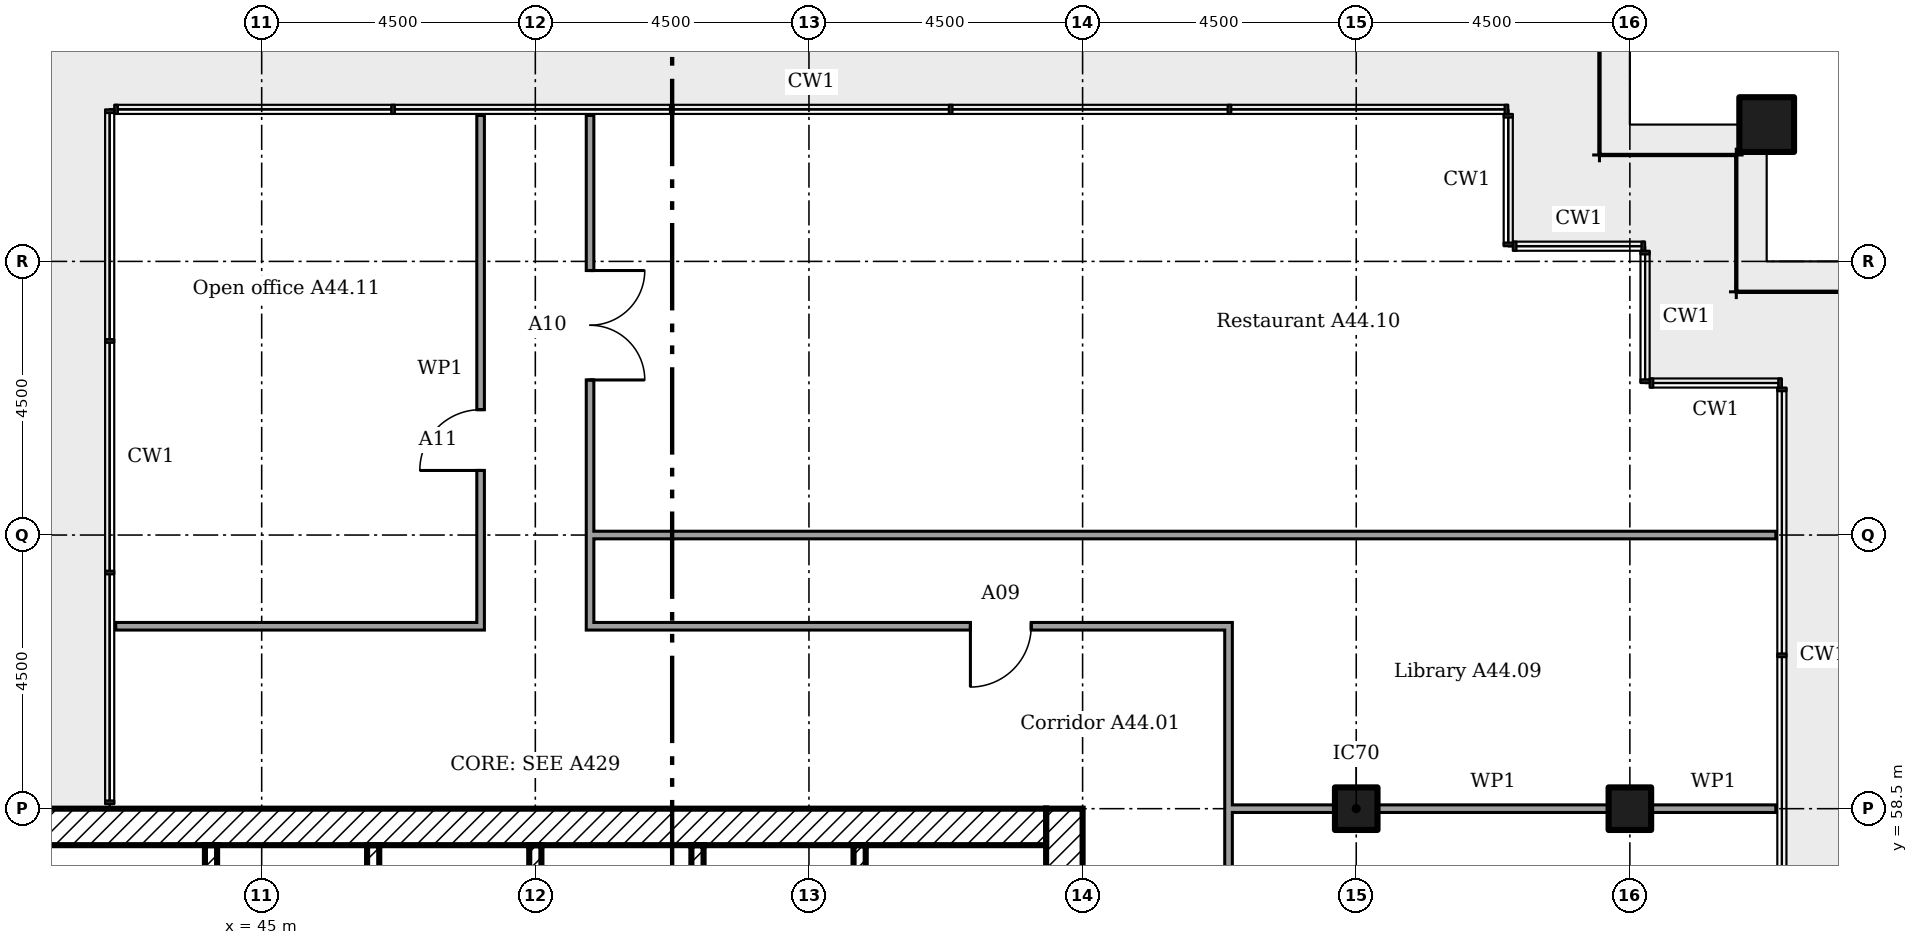
"""IFC4 building model, lengths in metres.
Left out: names, types, materials, properties, quantities, classifications, styles, units other than length and angle.
Written with IfcOpenShell. Run it as: python <this file> out.ifc"""

import sys

from ifc_helpers import new_model, si_unit, direction, frame, frame_2d, origin, origin_2d, place, context, subcontext, project, spatial, rectangle, extrude, element, fill, save


model = new_model("IFC4")
c1 = context("Model", 3, precision=1e-05, world=origin(), true_north=direction((0.0, 1.0)))
c2 = subcontext(c1, "Body", "Model", "MODEL_VIEW")
j1 = project(units=[si_unit("LENGTHUNIT", "METRE"), si_unit("PLANEANGLEUNIT", "RADIAN")], contexts=[c1])
p1 = place(None, origin())
s1 = spatial("IfcSite", under=j1, at=p1, CompositionType="ELEMENT")
p2 = place(p1, origin())
s2 = spatial("IfcBuilding", under=s1, at=p2, CompositionType="ELEMENT")
p3 = place(p2, frame((0.0, 0.0, 176.2)))
s3 = spatial("IfcBuildingStorey", under=s2, at=p3, CompositionType="ELEMENT", Elevation=176.2)
p4 = place(p3, frame((69.75, 69.75, 0.0)))
e1 = element("IfcColumn", 1, at=p4, inside=s3, PredefinedType="COLUMN", context=c2, shape_type="SweptSolid", body=[
    extrude(rectangle(XDim=0.9, YDim=0.9, at=origin_2d()), origin(), (0.0, 0.0, 1.0), 3.6),
])
for number, where in (
    (2, (63.0, 58.5, 0.0)),
    (3, (67.5, 58.5, 0.0)),
):
    element("IfcColumn", number, at=place(p3, frame(where)), inside=s3, PredefinedType="COLUMN", context=c2, shape_type="SweptSolid", body=[
        extrude(rectangle(XDim=0.7, YDim=0.7, at=origin_2d()), origin(), (0.0, 0.0, 1.0), 3.6),
    ])
p5 = place(p3, frame((58.2, 40.5, 0.0), z_axis=(0.0, 0.0, 1.0), x_axis=(0.0, 1.0, 0.0)))
e4 = element("IfcWall", 4, at=p5, inside=s3, PredefinedType="SHEAR", context=c2, shape_type="SweptSolid", body=[
    extrude(rectangle(XDim=18.0, YDim=0.6, at=frame_2d((9.0, 0.0))), origin(), (0.0, 0.0, 1.0), 3.35),
])
p6 = place(p5, frame((13.15, 0.0, 0.0)))
e5 = element("IfcOpeningElement", 5, at=p6, cuts=e4, PredefinedType="OPENING", context=c2, shape_type="SweptSolid", body=[
    extrude(rectangle(XDim=1.2, YDim=2.1, at=frame_2d((0.6, 1.05))), frame((0.0, 0.31, 0.0), z_axis=(0.0, -1.0, 0.0), x_axis=(1.0, 0.0, 0.0)), (0.0, 0.0, 1.0), 0.62),
])
p7 = place(p5, frame((3.9, 0.0, 0.0)))
e6 = element("IfcOpeningElement", 6, at=p7, cuts=e4, PredefinedType="OPENING", context=c2, shape_type="SweptSolid", body=[
    extrude(rectangle(XDim=1.8, YDim=2.1, at=frame_2d((0.9, 1.05))), frame((0.0, 0.31, 0.0), z_axis=(0.0, -1.0, 0.0), x_axis=(1.0, 0.0, 0.0)), (0.0, 0.0, 1.0), 0.62),
])
p8 = place(p5, frame((11.525, 0.0, 0.0)))
e7 = element("IfcOpeningElement", 7, at=p8, cuts=e4, PredefinedType="OPENING", context=c2, shape_type="SweptSolid", body=[
    extrude(rectangle(XDim=1.0, YDim=2.1, at=frame_2d((0.5, 1.05))), frame((0.0, 0.31, 0.0), z_axis=(0.0, -1.0, 0.0), x_axis=(1.0, 0.0, 0.0)), (0.0, 0.0, 1.0), 0.62),
])
p9 = place(p3, frame((40.5, 58.2, 0.0)))
e8 = element("IfcWall", 8, at=p9, inside=s3, PredefinedType="SHEAR", context=c2, shape_type="SweptSolid", body=[
    extrude(rectangle(XDim=17.4, YDim=0.6, at=frame_2d((8.7, 0.0))), origin(), (0.0, 0.0, 1.0), 3.35),
])
p10 = place(p3, frame((44.167, 57.9, 0.0), z_axis=(0.0, 0.0, 1.0), x_axis=(0.0, -1.0, 0.0)))
e9 = element("IfcWall", 9, at=p10, inside=s3, PredefinedType="SHEAR", context=c2, shape_type="SweptSolid", body=[
    extrude(rectangle(XDim=3.5, YDim=0.2, at=frame_2d((1.75, 0.0))), origin(), (0.0, 0.0, 1.0), 3.35),
])
p11 = place(p3, frame((46.833, 57.9, 0.0), z_axis=(0.0, 0.0, 1.0), x_axis=(0.0, -1.0, 0.0)))
e10 = element("IfcWall", 10, at=p11, inside=s3, PredefinedType="SHEAR", context=c2, shape_type="SweptSolid", body=[
    extrude(rectangle(XDim=4.6, YDim=0.2, at=frame_2d((2.3, 0.0))), origin(), (0.0, 0.0, 1.0), 3.35),
])
for number, where, z_axis, x_axis in (
    (11, (49.5, 57.9, 0.0), (0.0, 0.0, 1.0), (0.0, -1.0, 0.0)),
    (12, (52.167, 57.9, 0.0), (0.0, 0.0, 1.0), (0.0, -1.0, 0.0)),
    (13, (54.833, 57.9, 0.0), (0.0, 0.0, 1.0), (0.0, -1.0, 0.0)),
):
    element("IfcWall", number, at=place(p3, frame(where, z_axis=z_axis, x_axis=x_axis)), inside=s3, PredefinedType="SHEAR", context=c2, shape_type="SweptSolid", body=[
        extrude(rectangle(XDim=2.7, YDim=0.2, at=frame_2d((1.35, 0.0))), origin(), (0.0, 0.0, 1.0), 3.35),
    ])
p12 = place(p3, frame((60.9, 58.5, 0.0)))
e14 = element("IfcWall", 14, at=p12, inside=s3, PredefinedType="PARTITIONING", context=c2, shape_type="SweptSolid", body=[
    extrude(rectangle(XDim=1.75, YDim=0.125, at=frame_2d((0.875, 0.0))), origin(), (0.0, 0.0, 1.0), 2.676),
])
p13 = place(p3, frame((63.35, 58.5, 0.0)))
e15 = element("IfcWall", 15, at=p13, inside=s3, PredefinedType="PARTITIONING", context=c2, shape_type="SweptSolid", body=[
    extrude(rectangle(XDim=3.8, YDim=0.125, at=frame_2d((1.9, 0.0))), origin(), (0.0, 0.0, 1.0), 2.676),
])
p14 = place(p3, frame((67.85, 58.5, 0.0)))
e16 = element("IfcWall", 16, at=p14, inside=s3, PredefinedType="PARTITIONING", context=c2, shape_type="SweptSolid", body=[
    extrude(rectangle(XDim=2.05, YDim=0.125, at=frame_2d((1.025, 0.0))), origin(), (0.0, 0.0, 1.0), 2.676),
])
p15 = place(p3, frame((42.6, 61.5, 0.0)))
e17 = element("IfcWall", 17, at=p15, inside=s3, PredefinedType="PARTITIONING", context=c2, shape_type="SweptSolid", body=[
    extrude(rectangle(XDim=6.062, YDim=0.125, at=frame_2d((3.031, 0.0))), origin(), (0.0, 0.0, 1.0), 3.45),
])
p16 = place(p3, frame((50.337, 61.5, 0.0)))
e18 = element("IfcWall", 18, at=p16, inside=s3, PredefinedType="PARTITIONING", context=c2, shape_type="SweptSolid", body=[
    extrude(rectangle(XDim=10.625, YDim=0.125, at=frame_2d((5.312, 0.0))), origin(), (0.0, 0.0, 1.0), 3.45),
])
p17 = place(p16, frame((6.317, 0.0, 0.0)))
e19 = element("IfcOpeningElement", 19, at=p17, cuts=e18, PredefinedType="OPENING", context=c2, shape_type="SweptSolid", body=[
    extrude(rectangle(XDim=1.0, YDim=2.1, at=frame_2d((0.5, 1.05))), frame((0.0, 0.073, 0.0), z_axis=(0.0, -1.0, 0.0), x_axis=(1.0, 0.0, 0.0)), (0.0, 0.0, 1.0), 0.145),
])
p18 = place(p3, frame((50.4, 63.0, 0.0)))
e20 = element("IfcWall", 20, at=p18, inside=s3, PredefinedType="PARTITIONING", context=c2, shape_type="SweptSolid", body=[
    extrude(rectangle(XDim=19.5, YDim=0.125, at=frame_2d((9.75, 0.0))), origin(), (0.0, 0.0, 1.0), 3.45),
])
p19 = place(p3, frame((48.6, 61.562, 0.0), z_axis=(0.0, 0.0, 1.0), x_axis=(0.0, 1.0, 0.0)))
e21 = element("IfcWall", 21, at=p19, inside=s3, PredefinedType="PARTITIONING", context=c2, shape_type="SweptSolid", body=[
    extrude(rectangle(XDim=8.337, YDim=0.125, at=frame_2d((4.169, 0.0))), origin(), (0.0, 0.0, 1.0), 3.45),
])
p20 = place(p19, frame((2.5, 0.0, 0.0)))
e22 = element("IfcOpeningElement", 22, at=p20, cuts=e21, PredefinedType="OPENING", context=c2, shape_type="SweptSolid", body=[
    extrude(rectangle(XDim=1.0, YDim=2.1, at=frame_2d((0.5, 1.05))), frame((0.0, 0.073, 0.0), z_axis=(0.0, -1.0, 0.0), x_axis=(1.0, 0.0, 0.0)), (0.0, 0.0, 1.0), 0.145),
])
p21 = place(p3, frame((50.4, 61.562, 0.0), z_axis=(0.0, 0.0, 1.0), x_axis=(0.0, 1.0, 0.0)))
e23 = element("IfcWall", 23, at=p21, inside=s3, PredefinedType="PARTITIONING", context=c2, shape_type="SweptSolid", body=[
    extrude(rectangle(XDim=8.337, YDim=0.125, at=frame_2d((4.169, 0.0))), origin(), (0.0, 0.0, 1.0), 3.45),
])
p22 = place(p21, frame((3.988, 0.0, 0.0)))
e24 = element("IfcOpeningElement", 24, at=p22, cuts=e23, PredefinedType="OPENING", context=c2, shape_type="SweptSolid", body=[
    extrude(rectangle(XDim=1.8, YDim=2.1, at=frame_2d((0.9, 1.05))), frame((0.0, 0.073, 0.0), z_axis=(0.0, -1.0, 0.0), x_axis=(1.0, 0.0, 0.0)), (0.0, 0.0, 1.0), 0.145),
])
p23 = place(p3, frame((60.9, 38.163, 0.0), z_axis=(0.0, 0.0, 1.0), x_axis=(0.0, 1.0, 0.0)))
e25 = element("IfcWall", 25, at=p23, inside=s3, PredefinedType="PARTITIONING", context=c2, shape_type="SweptSolid", body=[
    extrude(rectangle(XDim=23.275, YDim=0.125, at=frame_2d((11.637, 0.0))), origin(), (0.0, 0.0, 1.0), 3.45),
])
p24 = place(p23, frame((3.633, 0.0, 0.0)))
e26 = element("IfcOpeningElement", 26, at=p24, cuts=e25, PredefinedType="OPENING", context=c2, shape_type="SweptSolid", body=[
    extrude(rectangle(XDim=1.0, YDim=2.1, at=frame_2d((0.5, 1.05))), frame((0.0, 0.073, 0.0), z_axis=(0.0, -1.0, 0.0), x_axis=(1.0, 0.0, 0.0)), (0.0, 0.0, 1.0), 0.145),
])
p25 = place(p23, frame((9.042, 0.0, 0.0)))
e27 = element("IfcOpeningElement", 27, at=p25, cuts=e25, PredefinedType="OPENING", context=c2, shape_type="SweptSolid", body=[
    extrude(rectangle(XDim=1.0, YDim=2.1, at=frame_2d((0.5, 1.05))), frame((0.0, 0.073, 0.0), z_axis=(0.0, -1.0, 0.0), x_axis=(1.0, 0.0, 0.0)), (0.0, 0.0, 1.0), 0.145),
])
p26 = place(p23, frame((13.087, 0.0, 0.0)))
e28 = element("IfcOpeningElement", 28, at=p26, cuts=e25, PredefinedType="OPENING", context=c2, shape_type="SweptSolid", body=[
    extrude(rectangle(XDim=1.0, YDim=2.1, at=frame_2d((0.5, 1.05))), frame((0.0, 0.073, 0.0), z_axis=(0.0, -1.0, 0.0), x_axis=(1.0, 0.0, 0.0)), (0.0, 0.0, 1.0), 0.145),
])
p27 = place(p23, frame((17.133, 0.0, 0.0)))
e29 = element("IfcOpeningElement", 29, at=p27, cuts=e25, PredefinedType="OPENING", context=c2, shape_type="SweptSolid", body=[
    extrude(rectangle(XDim=1.0, YDim=2.1, at=frame_2d((0.5, 1.05))), frame((0.0, 0.073, 0.0), z_axis=(0.0, -1.0, 0.0), x_axis=(1.0, 0.0, 0.0)), (0.0, 0.0, 1.0), 0.145),
])
p28 = place(p17, frame((1.0, 0.0, 0.0), x_axis=(-1.0, 0.0, 0.0)))
e30 = element("IfcDoor", 30, at=p28, inside=s3, OperationType="SINGLE_SWING_LEFT", PredefinedType="DOOR", context=c2, shape_type="SweptSolid", body=[
    extrude(rectangle(XDim=1.0, YDim=2.1, at=frame_2d((0.5, 1.05))), frame((0.0, 0.025, 0.0), z_axis=(0.0, -1.0, 0.0), x_axis=(1.0, 0.0, 0.0)), (0.0, 0.0, 1.0), 0.05),
])
fill(e19, e30)
p29 = place(p22, frame((1.8, 0.0, 0.0), x_axis=(-1.0, 0.0, 0.0)))
e31 = element("IfcDoor", 31, at=p29, inside=s3, OperationType="DOUBLE_DOOR_SINGLE_SWING", PredefinedType="DOOR", context=c2, shape_type="SweptSolid", body=[
    extrude(rectangle(XDim=1.8, YDim=2.1, at=frame_2d((0.9, 1.05))), frame((0.0, 0.025, 0.0), z_axis=(0.0, -1.0, 0.0), x_axis=(1.0, 0.0, 0.0)), (0.0, 0.0, 1.0), 0.05),
])
fill(e24, e31)
p30 = place(p20, origin())
e32 = element("IfcDoor", 32, at=p30, inside=s3, OperationType="SINGLE_SWING_RIGHT", PredefinedType="DOOR", context=c2, shape_type="SweptSolid", body=[
    extrude(rectangle(XDim=1.0, YDim=2.1, at=frame_2d((0.5, 1.05))), frame((0.0, 0.025, 0.0), z_axis=(0.0, -1.0, 0.0), x_axis=(1.0, 0.0, 0.0)), (0.0, 0.0, 1.0), 0.05),
])
fill(e22, e32)
save(model, sys.argv[1])
